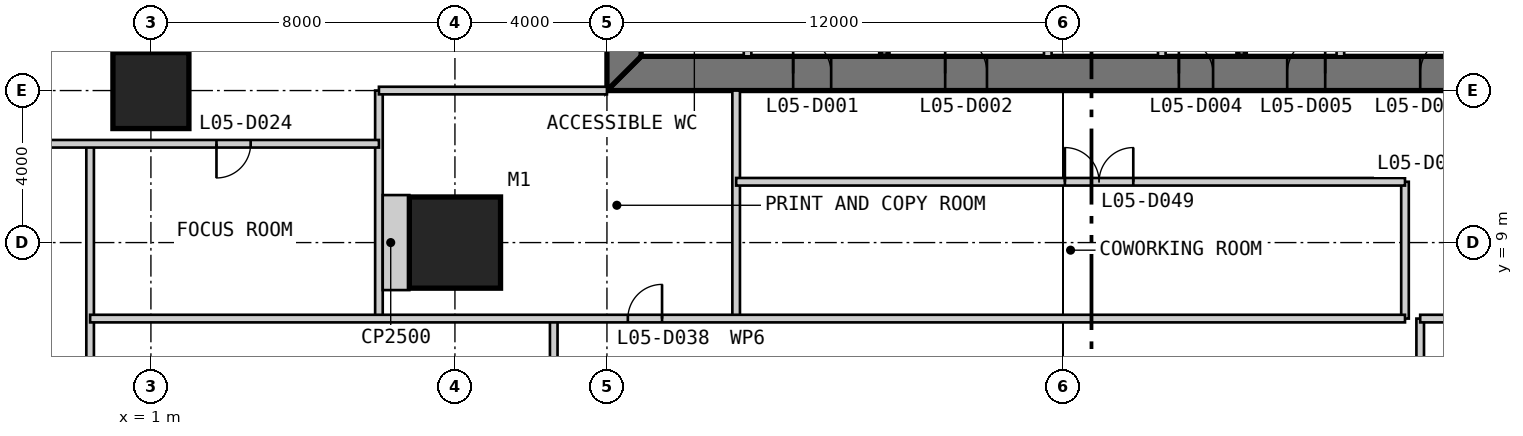
"""IFC4 building model, lengths in metres.
Left out: names, types, materials, properties, quantities, classifications, styles, units other than length and angle.
Written with IfcOpenShell. Run it as: python <this file> out.ifc"""

import sys

from ifc_helpers import new_model, si_unit, direction, frame, frame_2d, origin, origin_2d, place, context, subcontext, project, spatial, polyline, rectangle, outline, extrude, element, fill, save


model = new_model("IFC4")
c1 = context("Model", 3, precision=1e-05, world=origin(), true_north=direction((0.0, 1.0)))
c2 = subcontext(c1, "Body", "Model", "MODEL_VIEW")
j1 = project(units=[si_unit("LENGTHUNIT", "METRE"), si_unit("PLANEANGLEUNIT", "RADIAN")], contexts=[c1])
p1 = place(None, origin())
s1 = spatial("IfcSite", under=j1, at=p1, CompositionType="ELEMENT")
p2 = place(p1, origin())
s2 = spatial("IfcBuilding", under=s1, at=p2, CompositionType="ELEMENT")
p3 = place(p2, frame((0.0, 0.0, 26.2)))
s3 = spatial("IfcBuildingStorey", under=s2, at=p3, CompositionType="ELEMENT", Elevation=26.2)
p4 = place(p3, frame((9.0, 9.0, 0.0), z_axis=(0.0, 0.0, 1.0), x_axis=(1.0, 0.0, 0.0)))
e1 = element("IfcColumn", 1, at=p4, inside=s3, PredefinedType="COLUMN", context=c2, shape_type="SweptSolid", body=[
    extrude(rectangle(XDim=2.4, YDim=2.4, at=origin_2d()), origin(), (0.0, 0.0, 1.0), 4.8),
])
p5 = place(p3, frame((1.0, 13.0, 0.0), z_axis=(0.0, 0.0, 1.0), x_axis=(1.0, 0.0, 0.0)))
e2 = element("IfcColumn", 2, at=p5, inside=s3, PredefinedType="COLUMN", context=c2, shape_type="SweptSolid", body=[
    extrude(rectangle(XDim=2.0, YDim=2.0, at=origin_2d()), origin(), (0.0, 0.0, 1.0), 4.8),
])
p6 = place(p3, frame((13.0, 13.45, 0.0), z_axis=(0.0, 0.0, 1.0), x_axis=(1.0, 0.0, 0.0)))
e3 = element("IfcWall", 3, at=p6, inside=s3, PredefinedType="SHEAR", context=c2, shape_type="SweptSolid", body=[
    extrude(outline(polyline([(0.0, -0.45), (24.0, -0.45), (23.1, 0.45), (0.9, 0.45), (0.0, -0.45)])), origin(), (0.0, 0.0, 1.0), 4.8),
])
p7 = place(p6, frame((4.9, 0.0, 0.0)))
e4 = element("IfcOpeningElement", 4, at=p7, cuts=e3, PredefinedType="OPENING", context=c2, shape_type="SweptSolid", body=[
    extrude(rectangle(XDim=1.0, YDim=2.2, at=frame_2d((0.5, 1.1))), frame((0.0, 0.46, 0.0), z_axis=(0.0, -1.0, 0.0), x_axis=(1.0, 0.0, 0.0)), (0.0, 0.0, 1.0), 0.92),
])
p8 = place(p6, frame((8.9, 0.0, 0.0)))
e5 = element("IfcOpeningElement", 5, at=p8, cuts=e3, PredefinedType="OPENING", context=c2, shape_type="SweptSolid", body=[
    extrude(rectangle(XDim=1.1, YDim=2.2, at=frame_2d((0.55, 1.1))), frame((0.0, 0.46, 0.0), z_axis=(0.0, -1.0, 0.0), x_axis=(1.0, 0.0, 0.0)), (0.0, 0.0, 1.0), 0.92),
])
p9 = place(p6, frame((15.05, 0.0, 0.0)))
e6 = element("IfcOpeningElement", 6, at=p9, cuts=e3, PredefinedType="OPENING", context=c2, shape_type="SweptSolid", body=[
    extrude(rectangle(XDim=0.9, YDim=2.2, at=frame_2d((0.45, 1.1))), frame((0.0, 0.46, 0.0), z_axis=(0.0, -1.0, 0.0), x_axis=(1.0, 0.0, 0.0)), (0.0, 0.0, 1.0), 0.92),
])
p10 = place(p6, frame((17.9, 0.0, 0.0)))
e7 = element("IfcOpeningElement", 7, at=p10, cuts=e3, PredefinedType="OPENING", context=c2, shape_type="SweptSolid", body=[
    extrude(rectangle(XDim=1.0, YDim=2.2, at=frame_2d((0.5, 1.1))), frame((0.0, 0.46, 0.0), z_axis=(0.0, -1.0, 0.0), x_axis=(1.0, 0.0, 0.0)), (0.0, 0.0, 1.0), 0.92),
])
p11 = place(p6, frame((21.4, 0.0, 0.0)))
e8 = element("IfcOpeningElement", 8, at=p11, cuts=e3, PredefinedType="OPENING", context=c2, shape_type="SweptSolid", body=[
    extrude(rectangle(XDim=1.0, YDim=2.2, at=frame_2d((0.5, 1.1))), frame((0.0, 0.46, 0.0), z_axis=(0.0, -1.0, 0.0), x_axis=(1.0, 0.0, 0.0)), (0.0, 0.0, 1.0), 0.92),
])
p12 = place(p3, frame((13.45, 36.1, 0.0), z_axis=(0.0, 0.0, 1.0), x_axis=(0.0, -1.0, 0.0)))
e9 = element("IfcWall", 9, at=p12, inside=s3, PredefinedType="SHEAR", context=c2, shape_type="SweptSolid", body=[
    extrude(outline(polyline([(-0.9, -0.45), (23.1, -0.45), (22.2, 0.45), (0.0, 0.45), (-0.9, -0.45)])), origin(), (0.0, 0.0, 1.0), 4.8),
])
p13 = place(p12, frame((20.2, 0.0, 0.0)))
e10 = element("IfcOpeningElement", 10, at=p13, cuts=e9, PredefinedType="OPENING", context=c2, shape_type="SweptSolid", body=[
    extrude(rectangle(XDim=1.0, YDim=2.2, at=frame_2d((0.5, 1.1))), frame((0.0, 0.46, 0.0), z_axis=(0.0, -1.0, 0.0), x_axis=(1.0, 0.0, 0.0)), (0.0, 0.0, 1.0), 0.92),
])
p14 = place(p12, frame((17.25, 0.0, 0.0)))
e11 = element("IfcOpeningElement", 11, at=p14, cuts=e9, PredefinedType="OPENING", context=c2, shape_type="SweptSolid", body=[
    extrude(rectangle(XDim=0.9, YDim=2.2, at=frame_2d((0.45, 1.1))), frame((0.0, 0.46, 0.0), z_axis=(0.0, -1.0, 0.0), x_axis=(1.0, 0.0, 0.0)), (0.0, 0.0, 1.0), 0.92),
])
p15 = place(p3, frame((16.7, 13.9, 0.0), z_axis=(0.0, 0.0, 1.0), x_axis=(0.0, 1.0, 0.0)))
e12 = element("IfcWall", 12, at=p15, inside=s3, PredefinedType="PARTITIONING", context=c2, shape_type="SweptSolid", body=[
    extrude(rectangle(XDim=16.1, YDim=0.2, at=frame_2d((8.05, 0.0))), origin(), (0.0, 0.0, 1.0), 4.6),
])
p16 = place(p3, frame((20.3, 13.9, 0.0), z_axis=(0.0, 0.0, 1.0), x_axis=(0.0, 1.0, 0.0)))
e13 = element("IfcWall", 13, at=p16, inside=s3, PredefinedType="SOLIDWALL", context=c2, shape_type="SweptSolid", body=[
    extrude(rectangle(XDim=16.1, YDim=0.2, at=frame_2d((8.05, 0.0))), origin(), (0.0, 0.0, 1.0), 4.6),
])
p17 = place(p3, frame((24.6, 13.9, 0.0), z_axis=(0.0, 0.0, 1.0), x_axis=(0.0, 1.0, 0.0)))
e14 = element("IfcWall", 14, at=p17, inside=s3, PredefinedType="PARTITIONING", context=c2, shape_type="SweptSolid", body=[
    extrude(rectangle(XDim=3.3, YDim=0.2, at=frame_2d((1.65, 0.0))), origin(), (0.0, 0.0, 1.0), 4.6),
])
p18 = place(p17, frame((0.9, 0.0, 0.0)))
e15 = element("IfcOpeningElement", 15, at=p18, cuts=e14, PredefinedType="OPENING", context=c2, shape_type="SweptSolid", body=[
    extrude(rectangle(XDim=1.1, YDim=2.2, at=frame_2d((0.55, 1.1))), frame((0.0, 0.11, 0.0), z_axis=(0.0, -1.0, 0.0), x_axis=(1.0, 0.0, 0.0)), (0.0, 0.0, 1.0), 0.22),
])
p19 = place(p3, frame((27.6, 13.9, 0.0), z_axis=(0.0, 0.0, 1.0), x_axis=(0.0, 1.0, 0.0)))
e16 = element("IfcWall", 16, at=p19, inside=s3, PredefinedType="PARTITIONING", context=c2, shape_type="SweptSolid", body=[
    extrude(rectangle(XDim=3.3, YDim=0.2, at=frame_2d((1.65, 0.0))), origin(), (0.0, 0.0, 1.0), 4.6),
])
p20 = place(p3, frame((29.7, 13.9, 0.0), z_axis=(0.0, 0.0, 1.0), x_axis=(0.0, 1.0, 0.0)))
e17 = element("IfcWall", 17, at=p20, inside=s3, PredefinedType="SOLIDWALL", context=c2, shape_type="SweptSolid", body=[
    extrude(rectangle(XDim=6.1, YDim=0.2, at=frame_2d((3.05, 0.0))), origin(), (0.0, 0.0, 1.0), 4.6),
])
p21 = place(p3, frame((32.3, 13.9, 0.0), z_axis=(0.0, 0.0, 1.0), x_axis=(0.0, 1.0, 0.0)))
e18 = element("IfcWall", 18, at=p21, inside=s3, PredefinedType="PARTITIONING", context=c2, shape_type="SweptSolid", body=[
    extrude(rectangle(XDim=6.1, YDim=0.2, at=frame_2d((3.05, 0.0))), origin(), (0.0, 0.0, 1.0), 4.6),
])
p22 = place(p3, frame((-0.6, -7.25, 0.0), z_axis=(0.0, 0.0, 1.0), x_axis=(0.0, 1.0, 0.0)))
e19 = element("IfcWall", 19, at=p22, inside=s3, PredefinedType="PARTITIONING", context=c2, shape_type="SweptSolid", body=[
    extrude(rectangle(XDim=18.85, YDim=0.2, at=frame_2d((9.425, 0.0))), origin(), (0.0, 0.0, 1.0), 4.5),
])
p23 = place(p3, frame((7.0, 7.0, 0.0), z_axis=(0.0, 0.0, 1.0), x_axis=(0.0, 1.0, 0.0)))
e20 = element("IfcWall", 20, at=p23, inside=s3, PredefinedType="PARTITIONING", context=c2, shape_type="SweptSolid", body=[
    extrude(rectangle(XDim=6.0, YDim=0.2, at=frame_2d((3.0, 0.0))), origin(), (0.0, 0.0, 1.0), 4.5),
])
p24 = place(p3, frame((11.6, -7.25, 0.0), z_axis=(0.0, 0.0, 1.0), x_axis=(0.0, 1.0, 0.0)))
e21 = element("IfcWall", 21, at=p24, inside=s3, PredefinedType="PARTITIONING", context=c2, shape_type="SweptSolid", body=[
    extrude(rectangle(XDim=14.25, YDim=0.2, at=frame_2d((7.125, 0.0))), origin(), (0.0, 0.0, 1.0), 4.5),
])
p25 = place(p24, frame((5.225, 0.0, 0.0)))
e22 = element("IfcOpeningElement", 22, at=p25, cuts=e21, PredefinedType="OPENING", context=c2, shape_type="SweptSolid", body=[
    extrude(rectangle(XDim=1.8, YDim=2.4, at=frame_2d((0.9, 1.2))), frame((0.0, 0.11, 0.0), z_axis=(0.0, -1.0, 0.0), x_axis=(1.0, 0.0, 0.0)), (0.0, 0.0, 1.0), 0.22),
])
p26 = place(p3, frame((16.4, 7.0, 0.0), z_axis=(0.0, 0.0, 1.0), x_axis=(0.0, 1.0, 0.0)))
e23 = element("IfcWall", 23, at=p26, inside=s3, PredefinedType="PARTITIONING", context=c2, shape_type="SweptSolid", body=[
    extrude(rectangle(XDim=6.0, YDim=0.2, at=frame_2d((3.0, 0.0))), origin(), (0.0, 0.0, 1.0), 4.5),
])
p27 = place(p3, frame((34.0, 7.0, 0.0), z_axis=(0.0, 0.0, 1.0), x_axis=(0.0, 1.0, 0.0)))
e24 = element("IfcWall", 24, at=p27, inside=s3, PredefinedType="PARTITIONING", context=c2, shape_type="SweptSolid", body=[
    extrude(rectangle(XDim=3.6, YDim=0.2, at=frame_2d((1.8, 0.0))), origin(), (0.0, 0.0, 1.0), 3.893),
])
p28 = place(p3, frame((34.4, -7.25, 0.0), z_axis=(0.0, 0.0, 1.0), x_axis=(0.0, 1.0, 0.0)))
e25 = element("IfcWall", 25, at=p28, inside=s3, PredefinedType="PARTITIONING", context=c2, shape_type="SweptSolid", body=[
    extrude(rectangle(XDim=14.25, YDim=0.2, at=frame_2d((7.125, 0.0))), origin(), (0.0, 0.0, 1.0), 4.5),
])
p29 = place(p28, frame((2.45, 0.0, 0.0)))
e26 = element("IfcOpeningElement", 26, at=p29, cuts=e25, PredefinedType="OPENING", context=c2, shape_type="SweptSolid", body=[
    extrude(rectangle(XDim=1.8, YDim=2.4, at=frame_2d((0.9, 1.2))), frame((0.0, 0.11, 0.0), z_axis=(0.0, -1.0, 0.0), x_axis=(1.0, 0.0, 0.0)), (0.0, 0.0, 1.0), 0.22),
])
p30 = place(p28, frame((9.525, 0.0, 0.0)))
e27 = element("IfcOpeningElement", 27, at=p30, cuts=e25, PredefinedType="OPENING", context=c2, shape_type="SweptSolid", body=[
    extrude(rectangle(XDim=1.8, YDim=2.4, at=frame_2d((0.9, 1.2))), frame((0.0, 0.11, 0.0), z_axis=(0.0, -1.0, 0.0), x_axis=(1.0, 0.0, 0.0)), (0.0, 0.0, 1.0), 0.22),
])
p31 = place(p3, frame((-0.6, 7.0, 0.0), z_axis=(0.0, 0.0, 1.0), x_axis=(1.0, 0.0, 0.0)))
e28 = element("IfcWall", 28, at=p31, inside=s3, PredefinedType="PARTITIONING", context=c2, shape_type="SweptSolid", body=[
    extrude(rectangle(XDim=34.6, YDim=0.2, at=frame_2d((17.3, 0.0))), origin(), (0.0, 0.0, 1.0), 4.5),
])
p32 = place(p31, frame((14.15, 0.0, 0.0)))
e29 = element("IfcOpeningElement", 29, at=p32, cuts=e28, PredefinedType="OPENING", context=c2, shape_type="SweptSolid", body=[
    extrude(rectangle(XDim=0.9, YDim=2.2, at=frame_2d((0.45, 1.1))), frame((0.0, 0.11, 0.0), z_axis=(0.0, -1.0, 0.0), x_axis=(1.0, 0.0, 0.0)), (0.0, 0.0, 1.0), 0.22),
])
p33 = place(p3, frame((34.4, 7.0, 0.0), z_axis=(0.0, 0.0, 1.0), x_axis=(1.0, 0.0, 0.0)))
e30 = element("IfcWall", 30, at=p33, inside=s3, PredefinedType="PARTITIONING", context=c2, shape_type="SweptSolid", body=[
    extrude(rectangle(XDim=8.6, YDim=0.2, at=frame_2d((4.3, 0.0))), origin(), (0.0, 0.0, 1.0), 4.5),
])
p34 = place(p3, frame((16.4, 10.6, 0.0), z_axis=(0.0, 0.0, 1.0), x_axis=(1.0, 0.0, 0.0)))
e31 = element("IfcWall", 31, at=p34, inside=s3, PredefinedType="PARTITIONING", context=c2, shape_type="SweptSolid", body=[
    extrude(rectangle(XDim=17.6, YDim=0.2, at=frame_2d((8.8, 0.0))), origin(), (0.0, 0.0, 1.0), 4.5),
])
p35 = place(p34, frame((8.65, 0.0, 0.0)))
e32 = element("IfcOpeningElement", 32, at=p35, cuts=e31, PredefinedType="OPENING", context=c2, shape_type="SweptSolid", body=[
    extrude(rectangle(XDim=1.8, YDim=2.4, at=frame_2d((0.9, 1.2))), frame((0.0, 0.11, 0.0), z_axis=(0.0, -1.0, 0.0), x_axis=(1.0, 0.0, 0.0)), (0.0, 0.0, 1.0), 0.22),
])
p36 = place(p3, frame((-7.25, 11.6, 0.0), z_axis=(0.0, 0.0, 1.0), x_axis=(1.0, 0.0, 0.0)))
e33 = element("IfcWall", 33, at=p36, inside=s3, PredefinedType="PARTITIONING", context=c2, shape_type="SweptSolid", body=[
    extrude(rectangle(XDim=14.25, YDim=0.2, at=frame_2d((7.125, 0.0))), origin(), (0.0, 0.0, 1.0), 4.5),
])
p37 = place(p36, frame((2.45, 0.0, 0.0)))
e34 = element("IfcOpeningElement", 34, at=p37, cuts=e33, PredefinedType="OPENING", context=c2, shape_type="SweptSolid", body=[
    extrude(rectangle(XDim=1.8, YDim=2.4, at=frame_2d((0.9, 1.2))), frame((0.0, 0.11, 0.0), z_axis=(0.0, -1.0, 0.0), x_axis=(1.0, 0.0, 0.0)), (0.0, 0.0, 1.0), 0.22),
])
p38 = place(p36, frame((9.975, 0.0, 0.0)))
e35 = element("IfcOpeningElement", 35, at=p38, cuts=e33, PredefinedType="OPENING", context=c2, shape_type="SweptSolid", body=[
    extrude(rectangle(XDim=0.9, YDim=2.2, at=frame_2d((0.45, 1.1))), frame((0.0, 0.11, 0.0), z_axis=(0.0, -1.0, 0.0), x_axis=(1.0, 0.0, 0.0)), (0.0, 0.0, 1.0), 0.22),
])
p39 = place(p3, frame((7.0, 13.0, 0.0), z_axis=(0.0, 0.0, 1.0), x_axis=(1.0, 0.0, 0.0)))
e36 = element("IfcWall", 36, at=p39, inside=s3, PredefinedType="PARTITIONING", context=c2, shape_type="SweptSolid", body=[
    extrude(rectangle(XDim=6.0, YDim=0.2, at=frame_2d((3.0, 0.0))), origin(), (0.0, 0.0, 1.0), 3.703),
])
p40 = place(p3, frame((7.1, 9.0, 0.0), z_axis=(0.0, 0.0, 1.0), x_axis=(1.0, 0.0, 0.0)))
e37 = element("IfcWall", 37, at=p40, inside=s3, PredefinedType="PARTITIONING", context=c2, shape_type="SweptSolid", body=[
    extrude(rectangle(XDim=0.7, YDim=2.5, at=frame_2d((0.35, 0.0))), origin(), (0.0, 0.0, 1.0), 4.5),
])
p41 = place(p7, origin())
e38 = element("IfcDoor", 38, at=p41, inside=s3, OperationType="SINGLE_SWING_LEFT", PredefinedType="DOOR", context=c2, shape_type="SweptSolid", body=[
    extrude(rectangle(XDim=1.0, YDim=2.2, at=frame_2d((0.5, 1.1))), frame((0.0, 0.025, 0.0), z_axis=(0.0, -1.0, 0.0), x_axis=(1.0, 0.0, 0.0)), (0.0, 0.0, 1.0), 0.05),
    extrude(outline(polyline([(0.0, 0.0), (0.04, 0.0), (0.04, 2.16), (0.96, 2.16), (0.96, 0.0), (1.0, 0.0), (1.0, 2.2), (0.0, 2.2), (0.0, 0.0)])), frame((0.0, 0.3, 0.0), z_axis=(0.0, -1.0, 0.0), x_axis=(1.0, 0.0, 0.0)), (0.0, 0.0, 1.0), 0.6),
])
fill(e4, e38)
p42 = place(p8, origin())
e39 = element("IfcDoor", 39, at=p42, inside=s3, OperationType="SINGLE_SWING_LEFT", PredefinedType="DOOR", context=c2, shape_type="SweptSolid", body=[
    extrude(rectangle(XDim=1.1, YDim=2.2, at=frame_2d((0.55, 1.1))), frame((0.0, 0.025, 0.0), z_axis=(0.0, -1.0, 0.0), x_axis=(1.0, 0.0, 0.0)), (0.0, 0.0, 1.0), 0.05),
    extrude(outline(polyline([(0.0, 0.0), (0.04, 0.0), (0.04, 2.16), (1.06, 2.16), (1.06, 0.0), (1.1, 0.0), (1.1, 2.2), (0.0, 2.2), (0.0, 0.0)])), frame((0.0, 0.3, 0.0), z_axis=(0.0, -1.0, 0.0), x_axis=(1.0, 0.0, 0.0)), (0.0, 0.0, 1.0), 0.6),
])
fill(e5, e39)
p43 = place(p9, origin())
e40 = element("IfcDoor", 40, at=p43, inside=s3, OperationType="SINGLE_SWING_LEFT", PredefinedType="DOOR", context=c2, shape_type="SweptSolid", body=[
    extrude(rectangle(XDim=0.9, YDim=2.2, at=frame_2d((0.45, 1.1))), frame((0.0, 0.025, 0.0), z_axis=(0.0, -1.0, 0.0), x_axis=(1.0, 0.0, 0.0)), (0.0, 0.0, 1.0), 0.05),
    extrude(outline(polyline([(0.0, 0.0), (0.04, 0.0), (0.04, 2.16), (0.86, 2.16), (0.86, 0.0), (0.9, 0.0), (0.9, 2.2), (0.0, 2.2), (0.0, 0.0)])), frame((0.0, 0.3, 0.0), z_axis=(0.0, -1.0, 0.0), x_axis=(1.0, 0.0, 0.0)), (0.0, 0.0, 1.0), 0.6),
])
fill(e6, e40)
p44 = place(p10, origin())
e41 = element("IfcDoor", 41, at=p44, inside=s3, OperationType="SINGLE_SWING_RIGHT", PredefinedType="DOOR", context=c2, shape_type="SweptSolid", body=[
    extrude(rectangle(XDim=1.0, YDim=2.2, at=frame_2d((0.5, 1.1))), frame((0.0, 0.025, 0.0), z_axis=(0.0, -1.0, 0.0), x_axis=(1.0, 0.0, 0.0)), (0.0, 0.0, 1.0), 0.05),
    extrude(outline(polyline([(0.0, 0.0), (0.04, 0.0), (0.04, 2.16), (0.96, 2.16), (0.96, 0.0), (1.0, 0.0), (1.0, 2.2), (0.0, 2.2), (0.0, 0.0)])), frame((0.0, 0.3, 0.0), z_axis=(0.0, -1.0, 0.0), x_axis=(1.0, 0.0, 0.0)), (0.0, 0.0, 1.0), 0.6),
])
fill(e7, e41)
p45 = place(p11, origin())
e42 = element("IfcDoor", 42, at=p45, inside=s3, OperationType="SINGLE_SWING_RIGHT", PredefinedType="DOOR", context=c2, shape_type="SweptSolid", body=[
    extrude(rectangle(XDim=1.0, YDim=2.2, at=frame_2d((0.5, 1.1))), frame((0.0, 0.025, 0.0), z_axis=(0.0, -1.0, 0.0), x_axis=(1.0, 0.0, 0.0)), (0.0, 0.0, 1.0), 0.05),
    extrude(outline(polyline([(0.0, 0.0), (0.04, 0.0), (0.04, 2.16), (0.96, 2.16), (0.96, 0.0), (1.0, 0.0), (1.0, 2.2), (0.0, 2.2), (0.0, 0.0)])), frame((0.0, 0.3, 0.0), z_axis=(0.0, -1.0, 0.0), x_axis=(1.0, 0.0, 0.0)), (0.0, 0.0, 1.0), 0.6),
])
fill(e8, e42)
p46 = place(p38, frame((0.9, 0.0, 0.0), z_axis=(0.0, 0.0, 1.0), x_axis=(-1.0, 0.0, 0.0)))
e43 = element("IfcDoor", 43, at=p46, inside=s3, OperationType="SINGLE_SWING_RIGHT", PredefinedType="DOOR", context=c2, shape_type="SweptSolid", body=[
    extrude(rectangle(XDim=0.9, YDim=2.2, at=frame_2d((0.45, 1.1))), frame((0.0, 0.025, 0.0), z_axis=(0.0, -1.0, 0.0), x_axis=(1.0, 0.0, 0.0)), (0.0, 0.0, 1.0), 0.05),
])
fill(e35, e43)
p47 = place(p32, origin())
e44 = element("IfcDoor", 44, at=p47, inside=s3, OperationType="SINGLE_SWING_RIGHT", PredefinedType="DOOR", context=c2, shape_type="SweptSolid", body=[
    extrude(rectangle(XDim=0.9, YDim=2.2, at=frame_2d((0.45, 1.1))), frame((0.0, 0.025, 0.0), z_axis=(0.0, -1.0, 0.0), x_axis=(1.0, 0.0, 0.0)), (0.0, 0.0, 1.0), 0.05),
])
fill(e29, e44)
p48 = place(p35, origin())
e45 = element("IfcDoor", 45, at=p48, inside=s3, OperationType="DOUBLE_DOOR_SINGLE_SWING", PredefinedType="DOOR", context=c2, shape_type="SweptSolid", body=[
    extrude(rectangle(XDim=1.8, YDim=2.4, at=frame_2d((0.9, 1.2))), frame((0.0, 0.025, 0.0), z_axis=(0.0, -1.0, 0.0), x_axis=(1.0, 0.0, 0.0)), (0.0, 0.0, 1.0), 0.05),
])
fill(e32, e45)
save(model, sys.argv[1])
